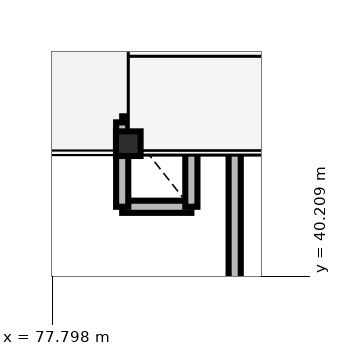
"""IFC4 building model, lengths in metres.
Left out: names, types, materials, properties, quantities, classifications, styles, units other than length and angle.
Written with IfcOpenShell. Run it as: python <this file> out.ifc"""

import sys

from ifc_helpers import new_model, si_unit, direction, frame, frame_2d, origin, origin_2d, place, context, subcontext, project, spatial, rectangle, hollow_circle, extrude, element, save


model = new_model("IFC4")
c1 = context("Model", 3, precision=1e-05, world=origin(), true_north=direction((0.0, 1.0)))
c2 = subcontext(c1, "Body", "Model", "MODEL_VIEW")
j1 = project(units=[si_unit("LENGTHUNIT", "METRE"), si_unit("PLANEANGLEUNIT", "RADIAN")], contexts=[c1])
p1 = place(None, origin())
s1 = spatial("IfcSite", under=j1, at=p1, CompositionType="ELEMENT")
p2 = place(p1, origin())
s2 = spatial("IfcBuilding", under=s1, at=p2, CompositionType="ELEMENT")
p3 = place(p2, frame((0.0, 0.0, 9.3)))
s3 = spatial("IfcBuildingStorey", under=s2, at=p3, CompositionType="ELEMENT", Elevation=9.3)
p4 = place(p3, frame((78.8, 41.95, 0.0), z_axis=(0.0, 0.0, 1.0), x_axis=(1.0, 0.0, 0.0)))
e1 = element("IfcColumn", 1, at=p4, inside=s3, PredefinedType="COLUMN", context=c2, shape_type="SweptSolid", body=[
    extrude(hollow_circle(Radius=0.162, WallThickness=0.012, at=origin_2d()), origin(), (0.0, 0.0, 1.0), 1.96),
])
for number, where, z_axis, x_axis in (
    (2, (78.72, 41.12, 0.0), (0.0, 0.0, 1.0), (1.0, 0.0, 0.0)),
    (3, (79.63, 42.23, 0.0), (0.0, 0.0, 1.0), (-1.0, 0.0, 0.0)),
):
    element("IfcWall", number, at=place(p3, frame(where, z_axis=z_axis, x_axis=x_axis)), inside=s3, PredefinedType="PARTITIONING", context=c2, shape_type="SweptSolid", body=[
        extrude(rectangle(XDim=0.91, YDim=0.16, at=frame_2d((0.455, 0.0))), origin(), (0.0, 0.0, 1.0), 3.475),
    ])
p5 = place(p3, frame((78.72, 42.23, 0.0), z_axis=(0.0, 0.0, 1.0), x_axis=(0.0, -1.0, 0.0)))
e4 = element("IfcWall", 4, at=p5, inside=s3, PredefinedType="PARTITIONING", context=c2, shape_type="SweptSolid", body=[
    extrude(rectangle(XDim=1.11, YDim=0.16, at=frame_2d((0.555, 0.0))), origin(), (0.0, 0.0, 1.0), 3.65),
])
p6 = place(p3, frame((79.63, 41.12, 0.0), z_axis=(0.0, 0.0, 1.0), x_axis=(0.0, 1.0, 0.0)))
e5 = element("IfcWall", 5, at=p6, inside=s3, PredefinedType="PARTITIONING", context=c2, shape_type="SweptSolid", body=[
    extrude(rectangle(XDim=1.11, YDim=0.16, at=frame_2d((0.555, 0.0))), origin(), (0.0, 0.0, 1.0), 3.475),
])
p7 = place(p3, frame((80.2, 36.22, 0.0), z_axis=(0.0, 0.0, 1.0), x_axis=(0.0, 1.0, 0.0)))
e6 = element("IfcWall", 6, at=p7, inside=s3, PredefinedType="PARTITIONING", context=c2, shape_type="SweptSolid", body=[
    extrude(rectangle(XDim=14.18, YDim=0.16, at=frame_2d((7.09, 0.0))), origin(), (0.0, 0.0, 1.0), 3.175),
])
p8 = place(p7, frame((1.68, 0.0, 0.0)))
e7 = element("IfcOpeningElement", 7, at=p8, cuts=e6, PredefinedType="OPENING", context=c2, shape_type="SweptSolid", body=[
    extrude(rectangle(XDim=1.2, YDim=2.15, at=frame_2d((0.6, 1.075))), frame((0.0, 0.09, 0.0), z_axis=(0.0, -1.0, 0.0), x_axis=(1.0, 0.0, 0.0)), (0.0, 0.0, 1.0), 0.18),
])
save(model, sys.argv[1])
